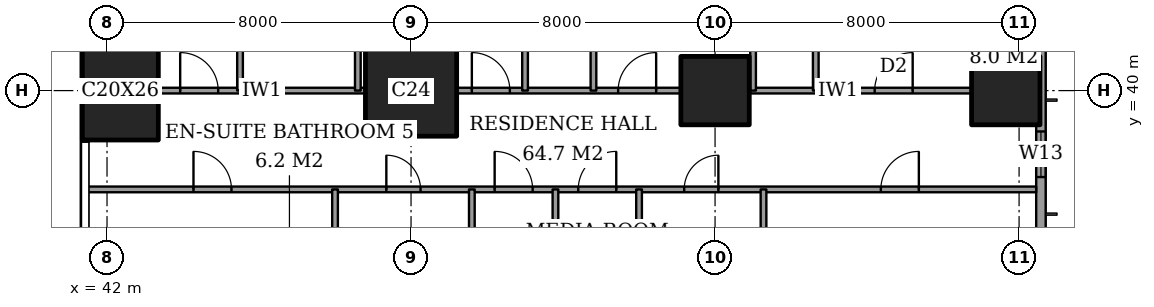
"""IFC4 building model, lengths in metres.
Left out: names, types, materials, properties, quantities, classifications, styles, units other than length and angle.
Written with IfcOpenShell. Run it as: python <this file> out.ifc"""

import sys

from ifc_helpers import new_model, si_unit, direction, frame, frame_2d, origin, origin_2d, place, context, subcontext, project, spatial, rectangle, extrude, element, fill, save


model = new_model("IFC4")
c1 = context("Model", 3, precision=1e-05, world=origin(), true_north=direction((0.0, 1.0)))
c2 = subcontext(c1, "Body", "Model", "MODEL_VIEW")
j1 = project(units=[si_unit("LENGTHUNIT", "METRE"), si_unit("PLANEANGLEUNIT", "RADIAN")], contexts=[c1])
p1 = place(None, origin())
s1 = spatial("IfcSite", under=j1, at=p1, CompositionType="ELEMENT")
p2 = place(p1, origin())
s2 = spatial("IfcBuilding", under=s1, at=p2, CompositionType="ELEMENT")
p3 = place(p2, frame((0.0, 0.0, 185.8)))
s3 = spatial("IfcBuildingStorey", under=s2, at=p3, CompositionType="ELEMENT", Elevation=185.8)
p4 = place(p3, frame((42.35, 40.0, 0.0), z_axis=(0.0, 0.0, 1.0), x_axis=(1.0, 0.0, 0.0)))
e1 = element("IfcColumn", 1, at=p4, inside=s3, PredefinedType="COLUMN", context=c2, shape_type="SweptSolid", body=[
    extrude(rectangle(XDim=2.0, YDim=2.6, at=origin_2d()), origin(), (0.0, 0.0, 1.0), 3.6),
])
p5 = place(p3, frame((50.0, 40.0, 0.0), z_axis=(0.0, 0.0, 1.0), x_axis=(1.0, 0.0, 0.0)))
e2 = element("IfcColumn", 2, at=p5, inside=s3, PredefinedType="COLUMN", context=c2, shape_type="SweptSolid", body=[
    extrude(rectangle(XDim=2.4, YDim=2.4, at=origin_2d()), origin(), (0.0, 0.0, 1.0), 3.6),
])
for number, where, z_axis, x_axis in (
    (3, (58.0, 40.0, 0.0), (0.0, 0.0, 1.0), (1.0, 0.0, 0.0)),
    (4, (65.65, 40.0, 0.0), (0.0, 0.0, 1.0), (1.0, 0.0, 0.0)),
):
    element("IfcColumn", number, at=place(p3, frame(where, z_axis=z_axis, x_axis=x_axis)), inside=s3, PredefinedType="COLUMN", context=c2, shape_type="SweptSolid", body=[
        extrude(rectangle(XDim=1.8, YDim=1.8, at=origin_2d()), origin(), (0.0, 0.0, 1.0), 3.6),
    ])
p6 = place(p3, frame((66.575, 3.175, 0.0), z_axis=(0.0, 0.0, 1.0), x_axis=(0.0, 1.0, 0.0)))
e5 = element("IfcWall", 5, at=p6, inside=s3, PredefinedType="SOLIDWALL", context=c2, shape_type="SweptSolid", body=[
    extrude(rectangle(XDim=41.65, YDim=0.25, at=frame_2d((20.825, 0.0))), origin(), (0.0, 0.0, 1.0), 3.6),
])
p7 = place(p6, frame((0.825, 0.0, 0.2)))
e6 = element("IfcOpeningElement", 6, at=p7, cuts=e5, PredefinedType="OPENING", context=c2, shape_type="SweptSolid", body=[
    extrude(rectangle(XDim=2.4, YDim=2.4, at=frame_2d((1.2, 1.2))), frame((0.0, 0.135, 0.0), z_axis=(0.0, -1.0, 0.0), x_axis=(1.0, 0.0, 0.0)), (0.0, 0.0, 1.0), 0.27),
])
p8 = place(p6, frame((6.6, 0.0, 0.2)))
e7 = element("IfcOpeningElement", 7, at=p8, cuts=e5, PredefinedType="OPENING", context=c2, shape_type="SweptSolid", body=[
    extrude(rectangle(XDim=1.2, YDim=2.4, at=frame_2d((0.6, 1.2))), frame((0.0, 0.135, 0.0), z_axis=(0.0, -1.0, 0.0), x_axis=(1.0, 0.0, 0.0)), (0.0, 0.0, 1.0), 0.27),
])
p9 = place(p6, frame((8.775, 0.0, 0.2)))
e8 = element("IfcOpeningElement", 8, at=p9, cuts=e5, PredefinedType="OPENING", context=c2, shape_type="SweptSolid", body=[
    extrude(rectangle(XDim=2.4, YDim=2.4, at=frame_2d((1.2, 1.2))), frame((0.0, 0.135, 0.0), z_axis=(0.0, -1.0, 0.0), x_axis=(1.0, 0.0, 0.0)), (0.0, 0.0, 1.0), 0.27),
])
p10 = place(p6, frame((15.675, 0.0, 0.2)))
e9 = element("IfcOpeningElement", 9, at=p10, cuts=e5, PredefinedType="OPENING", context=c2, shape_type="SweptSolid", body=[
    extrude(rectangle(XDim=2.4, YDim=2.4, at=frame_2d((1.2, 1.2))), frame((0.0, 0.135, 0.0), z_axis=(0.0, -1.0, 0.0), x_axis=(1.0, 0.0, 0.0)), (0.0, 0.0, 1.0), 0.27),
])
p11 = place(p6, frame((23.575, 0.0, 0.2)))
e10 = element("IfcOpeningElement", 10, at=p11, cuts=e5, PredefinedType="OPENING", context=c2, shape_type="SweptSolid", body=[
    extrude(rectangle(XDim=2.4, YDim=2.4, at=frame_2d((1.2, 1.2))), frame((0.0, 0.135, 0.0), z_axis=(0.0, -1.0, 0.0), x_axis=(1.0, 0.0, 0.0)), (0.0, 0.0, 1.0), 0.27),
])
p12 = place(p6, frame((30.775, 0.0, 0.2)))
e11 = element("IfcOpeningElement", 11, at=p12, cuts=e5, PredefinedType="OPENING", context=c2, shape_type="SweptSolid", body=[
    extrude(rectangle(XDim=2.4, YDim=2.4, at=frame_2d((1.2, 1.2))), frame((0.0, 0.135, 0.0), z_axis=(0.0, -1.0, 0.0), x_axis=(1.0, 0.0, 0.0)), (0.0, 0.0, 1.0), 0.27),
])
p13 = place(p6, frame((34.55, 0.0, 0.2)))
e12 = element("IfcOpeningElement", 12, at=p13, cuts=e5, PredefinedType="OPENING", context=c2, shape_type="SweptSolid", body=[
    extrude(rectangle(XDim=1.2, YDim=2.4, at=frame_2d((0.6, 1.2))), frame((0.0, 0.135, 0.0), z_axis=(0.0, -1.0, 0.0), x_axis=(1.0, 0.0, 0.0)), (0.0, 0.0, 1.0), 0.27),
])
p14 = place(p6, frame((38.425, 0.0, 0.2)))
e13 = element("IfcOpeningElement", 13, at=p14, cuts=e5, PredefinedType="OPENING", context=c2, shape_type="SweptSolid", body=[
    extrude(rectangle(XDim=2.4, YDim=2.4, at=frame_2d((1.2, 1.2))), frame((0.0, 0.135, 0.0), z_axis=(0.0, -1.0, 0.0), x_axis=(1.0, 0.0, 0.0)), (0.0, 0.0, 1.0), 0.27),
])
p15 = place(p3, frame((41.439, 37.4, 0.0), z_axis=(0.0, 0.0, 1.0), x_axis=(1.0, 0.0, 0.0)))
e14 = element("IfcWall", 14, at=p15, inside=s3, PredefinedType="PARTITIONING", context=c2, shape_type="SweptSolid", body=[
    extrude(rectangle(XDim=25.011, YDim=0.15, at=frame_2d((12.505, 0.0))), origin(), (0.0, 0.0, 1.0), 3.35),
])
p16 = place(p15, frame((10.761, 0.0, 0.0)))
e15 = element("IfcOpeningElement", 15, at=p16, cuts=e14, PredefinedType="OPENING", context=c2, shape_type="SweptSolid", body=[
    extrude(rectangle(XDim=1.0, YDim=2.1, at=frame_2d((0.5, 1.05))), frame((0.0, 0.085, 0.0), z_axis=(0.0, -1.0, 0.0), x_axis=(1.0, 0.0, 0.0)), (0.0, 0.0, 1.0), 0.17),
])
p17 = place(p15, frame((20.924, 0.0, 0.0)))
e16 = element("IfcOpeningElement", 16, at=p17, cuts=e14, PredefinedType="OPENING", context=c2, shape_type="SweptSolid", body=[
    extrude(rectangle(XDim=1.0, YDim=2.1, at=frame_2d((0.5, 1.05))), frame((0.0, 0.085, 0.0), z_axis=(0.0, -1.0, 0.0), x_axis=(1.0, 0.0, 0.0)), (0.0, 0.0, 1.0), 0.17),
])
p18 = place(p15, frame((15.749, 0.0, 0.0)))
e17 = element("IfcOpeningElement", 17, at=p18, cuts=e14, PredefinedType="OPENING", context=c2, shape_type="SweptSolid", body=[
    extrude(rectangle(XDim=0.9, YDim=2.1, at=frame_2d((0.45, 1.05))), frame((0.0, 0.085, 0.0), z_axis=(0.0, -1.0, 0.0), x_axis=(1.0, 0.0, 0.0)), (0.0, 0.0, 1.0), 0.17),
])
p19 = place(p15, frame((12.961, 0.0, 0.0)))
e18 = element("IfcOpeningElement", 18, at=p19, cuts=e14, PredefinedType="OPENING", context=c2, shape_type="SweptSolid", body=[
    extrude(rectangle(XDim=1.0, YDim=2.1, at=frame_2d((0.5, 1.05))), frame((0.0, 0.085, 0.0), z_axis=(0.0, -1.0, 0.0), x_axis=(1.0, 0.0, 0.0)), (0.0, 0.0, 1.0), 0.17),
])
p20 = place(p15, frame((7.911, 0.0, 0.0)))
e19 = element("IfcOpeningElement", 19, at=p20, cuts=e14, PredefinedType="OPENING", context=c2, shape_type="SweptSolid", body=[
    extrude(rectangle(XDim=0.9, YDim=2.1, at=frame_2d((0.45, 1.05))), frame((0.0, 0.085, 0.0), z_axis=(0.0, -1.0, 0.0), x_axis=(1.0, 0.0, 0.0)), (0.0, 0.0, 1.0), 0.17),
])
p21 = place(p15, frame((2.836, 0.0, 0.0)))
e20 = element("IfcOpeningElement", 20, at=p21, cuts=e14, PredefinedType="OPENING", context=c2, shape_type="SweptSolid", body=[
    extrude(rectangle(XDim=1.0, YDim=2.1, at=frame_2d((0.5, 1.05))), frame((0.0, 0.085, 0.0), z_axis=(0.0, -1.0, 0.0), x_axis=(1.0, 0.0, 0.0)), (0.0, 0.0, 1.0), 0.17),
])
p22 = place(p3, frame((43.35, 40.0, 0.0), z_axis=(0.0, 0.0, 1.0), x_axis=(1.0, 0.0, 0.0)))
e21 = element("IfcWall", 21, at=p22, inside=s3, PredefinedType="PARTITIONING", context=c2, shape_type="SweptSolid", body=[
    extrude(rectangle(XDim=5.45, YDim=0.15, at=frame_2d((2.725, 0.0))), origin(), (0.0, 0.0, 1.0), 3.35),
])
p23 = place(p22, frame((0.575, 0.0, 0.0)))
e22 = element("IfcOpeningElement", 22, at=p23, cuts=e21, PredefinedType="OPENING", context=c2, shape_type="SweptSolid", body=[
    extrude(rectangle(XDim=1.0, YDim=2.1, at=frame_2d((0.5, 1.05))), frame((0.0, 0.085, 0.0), z_axis=(0.0, -1.0, 0.0), x_axis=(1.0, 0.0, 0.0)), (0.0, 0.0, 1.0), 0.17),
])
p24 = place(p3, frame((51.2, 40.0, 0.0), z_axis=(0.0, 0.0, 1.0), x_axis=(1.0, 0.0, 0.0)))
e23 = element("IfcWall", 23, at=p24, inside=s3, PredefinedType="PARTITIONING", context=c2, shape_type="SweptSolid", body=[
    extrude(rectangle(XDim=5.9, YDim=0.15, at=frame_2d((2.95, 0.0))), origin(), (0.0, 0.0, 1.0), 3.35),
])
p25 = place(p24, frame((4.25, 0.0, 0.0)))
e24 = element("IfcOpeningElement", 24, at=p25, cuts=e23, PredefinedType="OPENING", context=c2, shape_type="SweptSolid", body=[
    extrude(rectangle(XDim=1.0, YDim=2.1, at=frame_2d((0.5, 1.05))), frame((0.0, 0.085, 0.0), z_axis=(0.0, -1.0, 0.0), x_axis=(1.0, 0.0, 0.0)), (0.0, 0.0, 1.0), 0.17),
])
p26 = place(p24, frame((0.4, 0.0, 0.0)))
e25 = element("IfcOpeningElement", 25, at=p26, cuts=e23, PredefinedType="OPENING", context=c2, shape_type="SweptSolid", body=[
    extrude(rectangle(XDim=1.0, YDim=2.1, at=frame_2d((0.5, 1.05))), frame((0.0, 0.085, 0.0), z_axis=(0.0, -1.0, 0.0), x_axis=(1.0, 0.0, 0.0)), (0.0, 0.0, 1.0), 0.17),
])
p27 = place(p3, frame((58.9, 40.0, 0.0), z_axis=(0.0, 0.0, 1.0), x_axis=(1.0, 0.0, 0.0)))
e26 = element("IfcWall", 26, at=p27, inside=s3, PredefinedType="PARTITIONING", context=c2, shape_type="SweptSolid", body=[
    extrude(rectangle(XDim=5.85, YDim=0.15, at=frame_2d((2.925, 0.0))), origin(), (0.0, 0.0, 1.0), 3.35),
])
p28 = place(p27, frame((3.3, 0.0, 0.0)))
e27 = element("IfcOpeningElement", 27, at=p28, cuts=e26, PredefinedType="OPENING", context=c2, shape_type="SweptSolid", body=[
    extrude(rectangle(XDim=1.0, YDim=2.1, at=frame_2d((0.5, 1.05))), frame((0.0, 0.085, 0.0), z_axis=(0.0, -1.0, 0.0), x_axis=(1.0, 0.0, 0.0)), (0.0, 0.0, 1.0), 0.17),
])
p29 = place(p3, frame((45.5, 40.0, 0.0), z_axis=(0.0, 0.0, 1.0), x_axis=(0.0, 1.0, 0.0)))
e28 = element("IfcWall", 28, at=p29, inside=s3, PredefinedType="PARTITIONING", context=c2, shape_type="SweptSolid", body=[
    extrude(rectangle(XDim=8.45, YDim=0.15, at=frame_2d((4.225, 0.0))), origin(), (0.0, 0.0, 1.0), 3.35),
])
p30 = place(p3, frame((48.0, 28.0, 0.0), z_axis=(0.0, 0.0, 1.0), x_axis=(0.0, 1.0, 0.0)))
e29 = element("IfcWall", 29, at=p30, inside=s3, PredefinedType="PARTITIONING", context=c2, shape_type="SweptSolid", body=[
    extrude(rectangle(XDim=9.4, YDim=0.15, at=frame_2d((4.7, 0.0))), origin(), (0.0, 0.0, 1.0), 3.35),
])
p31 = place(p30, frame((0.5, 0.0, 0.0)))
e30 = element("IfcOpeningElement", 30, at=p31, cuts=e29, PredefinedType="OPENING", context=c2, shape_type="SweptSolid", body=[
    extrude(rectangle(XDim=1.0, YDim=2.1, at=frame_2d((0.5, 1.05))), frame((0.0, 0.085, 0.0), z_axis=(0.0, -1.0, 0.0), x_axis=(1.0, 0.0, 0.0)), (0.0, 0.0, 1.0), 0.17),
])
p32 = place(p3, frame((48.6, 40.0, 0.0), z_axis=(0.0, 0.0, 1.0), x_axis=(0.0, 1.0, 0.0)))
e31 = element("IfcWall", 31, at=p32, inside=s3, PredefinedType="PARTITIONING", context=c2, shape_type="SweptSolid", body=[
    extrude(rectangle(XDim=8.45, YDim=0.15, at=frame_2d((4.225, 0.0))), origin(), (0.0, 0.0, 1.0), 3.35),
])
p33 = place(p32, frame((3.775, 0.0, 0.0)))
e32 = element("IfcOpeningElement", 32, at=p33, cuts=e31, PredefinedType="OPENING", context=c2, shape_type="SweptSolid", body=[
    extrude(rectangle(XDim=0.9, YDim=2.1, at=frame_2d((0.45, 1.05))), frame((0.0, 0.085, 0.0), z_axis=(0.0, -1.0, 0.0), x_axis=(1.0, 0.0, 0.0)), (0.0, 0.0, 1.0), 0.17),
])
p34 = place(p3, frame((51.6, 30.0, 0.0), z_axis=(0.0, 0.0, 1.0), x_axis=(0.0, 1.0, 0.0)))
e33 = element("IfcWall", 33, at=p34, inside=s3, PredefinedType="PARTITIONING", context=c2, shape_type="SweptSolid", body=[
    extrude(rectangle(XDim=7.4, YDim=0.15, at=frame_2d((3.7, 0.0))), origin(), (0.0, 0.0, 1.0), 3.35),
])
p35 = place(p3, frame((53.0, 40.0, 0.0), z_axis=(0.0, 0.0, 1.0), x_axis=(0.0, 1.0, 0.0)))
e34 = element("IfcWall", 34, at=p35, inside=s3, PredefinedType="PARTITIONING", context=c2, shape_type="SweptSolid", body=[
    extrude(rectangle(XDim=8.45, YDim=0.15, at=frame_2d((4.225, 0.0))), origin(), (0.0, 0.0, 1.0), 3.35),
])
p36 = place(p3, frame((53.8, 30.0, 0.0), z_axis=(0.0, 0.0, 1.0), x_axis=(0.0, 1.0, 0.0)))
e35 = element("IfcWall", 35, at=p36, inside=s3, PredefinedType="PARTITIONING", context=c2, shape_type="SweptSolid", body=[
    extrude(rectangle(XDim=7.4, YDim=0.15, at=frame_2d((3.7, 0.0))), origin(), (0.0, 0.0, 1.0), 3.35),
])
p37 = place(p3, frame((54.8, 40.0, 0.0), z_axis=(0.0, 0.0, 1.0), x_axis=(0.0, 1.0, 0.0)))
e36 = element("IfcWall", 36, at=p37, inside=s3, PredefinedType="PARTITIONING", context=c2, shape_type="SweptSolid", body=[
    extrude(rectangle(XDim=8.45, YDim=0.15, at=frame_2d((4.225, 0.0))), origin(), (0.0, 0.0, 1.0), 3.35),
])
p38 = place(p37, frame((3.775, 0.0, 0.0)))
e37 = element("IfcOpeningElement", 37, at=p38, cuts=e36, PredefinedType="OPENING", context=c2, shape_type="SweptSolid", body=[
    extrude(rectangle(XDim=0.9, YDim=2.1, at=frame_2d((0.45, 1.05))), frame((0.0, 0.085, 0.0), z_axis=(0.0, -1.0, 0.0), x_axis=(1.0, 0.0, 0.0)), (0.0, 0.0, 1.0), 0.17),
])
p39 = place(p3, frame((56.0, 28.0, 0.0), z_axis=(0.0, 0.0, 1.0), x_axis=(0.0, 1.0, 0.0)))
e38 = element("IfcWall", 38, at=p39, inside=s3, PredefinedType="PARTITIONING", context=c2, shape_type="SweptSolid", body=[
    extrude(rectangle(XDim=9.4, YDim=0.15, at=frame_2d((4.7, 0.0))), origin(), (0.0, 0.0, 1.0), 3.35),
])
p40 = place(p39, frame((0.5, 0.0, 0.0)))
e39 = element("IfcOpeningElement", 39, at=p40, cuts=e38, PredefinedType="OPENING", context=c2, shape_type="SweptSolid", body=[
    extrude(rectangle(XDim=1.0, YDim=2.1, at=frame_2d((0.5, 1.05))), frame((0.0, 0.085, 0.0), z_axis=(0.0, -1.0, 0.0), x_axis=(1.0, 0.0, 0.0)), (0.0, 0.0, 1.0), 0.17),
])
p41 = place(p3, frame((59.0, 40.0, 0.0), z_axis=(0.0, 0.0, 1.0), x_axis=(0.0, 1.0, 0.0)))
e40 = element("IfcWall", 40, at=p41, inside=s3, PredefinedType="PARTITIONING", context=c2, shape_type="SweptSolid", body=[
    extrude(rectangle(XDim=8.45, YDim=0.15, at=frame_2d((4.225, 0.0))), origin(), (0.0, 0.0, 1.0), 3.35),
])
p42 = place(p3, frame((59.275, 33.2, 0.0), z_axis=(0.0, 0.0, 1.0), x_axis=(0.0, 1.0, 0.0)))
e41 = element("IfcWall", 41, at=p42, inside=s3, PredefinedType="PARTITIONING", context=c2, shape_type="SweptSolid", body=[
    extrude(rectangle(XDim=4.2, YDim=0.15, at=frame_2d((2.1, 0.0))), origin(), (0.0, 0.0, 1.0), 3.35),
])
p43 = place(p3, frame((60.65, 40.0, 0.0), z_axis=(0.0, 0.0, 1.0), x_axis=(0.0, 1.0, 0.0)))
e42 = element("IfcWall", 42, at=p43, inside=s3, PredefinedType="PARTITIONING", context=c2, shape_type="SweptSolid", body=[
    extrude(rectangle(XDim=8.45, YDim=0.15, at=frame_2d((4.225, 0.0))), origin(), (0.0, 0.0, 1.0), 3.35),
])
p44 = place(p43, frame((3.775, 0.0, 0.0)))
e43 = element("IfcOpeningElement", 43, at=p44, cuts=e42, PredefinedType="OPENING", context=c2, shape_type="SweptSolid", body=[
    extrude(rectangle(XDim=0.9, YDim=2.1, at=frame_2d((0.45, 1.05))), frame((0.0, 0.085, 0.0), z_axis=(0.0, -1.0, 0.0), x_axis=(1.0, 0.0, 0.0)), (0.0, 0.0, 1.0), 0.17),
])
p45 = place(p3, frame((64.75, 40.9, 0.0), z_axis=(0.0, 0.0, 1.0), x_axis=(0.0, 1.0, 0.0)))
e44 = element("IfcWall", 44, at=p45, inside=s3, PredefinedType="PARTITIONING", context=c2, shape_type="SweptSolid", body=[
    extrude(rectangle(XDim=3.8, YDim=0.15, at=frame_2d((1.9, 0.0))), origin(), (0.0, 0.0, 1.0), 3.35),
])
p46 = place(p45, frame((1.45, 0.0, 0.0)))
e45 = element("IfcOpeningElement", 45, at=p46, cuts=e44, PredefinedType="OPENING", context=c2, shape_type="SweptSolid", body=[
    extrude(rectangle(XDim=0.9, YDim=2.1, at=frame_2d((0.45, 1.05))), frame((0.0, 0.085, 0.0), z_axis=(0.0, -1.0, 0.0), x_axis=(1.0, 0.0, 0.0)), (0.0, 0.0, 1.0), 0.17),
])
p47 = place(p13, origin())
e46 = element("IfcWindow", 46, at=p47, inside=s3, PartitioningType="SINGLE_PANEL", PredefinedType="WINDOW", context=c2, shape_type="SweptSolid", body=[
    extrude(rectangle(XDim=1.2, YDim=2.4, at=frame_2d((0.6, 1.2))), frame((0.0, 0.03, 0.0), z_axis=(0.0, -1.0, 0.0), x_axis=(1.0, 0.0, 0.0)), (0.0, 0.0, 1.0), 0.06),
])
fill(e12, e46)
p48 = place(p28, origin())
e47 = element("IfcDoor", 47, at=p48, inside=s3, OperationType="SINGLE_SWING_LEFT", PredefinedType="DOOR", context=c2, shape_type="SweptSolid", body=[
    extrude(rectangle(XDim=1.0, YDim=2.1, at=frame_2d((0.5, 1.05))), frame((0.0, 0.025, 0.0), z_axis=(0.0, -1.0, 0.0), x_axis=(1.0, 0.0, 0.0)), (0.0, 0.0, 1.0), 0.05),
])
fill(e27, e47)
p49 = place(p25, origin())
e48 = element("IfcDoor", 48, at=p49, inside=s3, OperationType="SINGLE_SWING_LEFT", PredefinedType="DOOR", context=c2, shape_type="SweptSolid", body=[
    extrude(rectangle(XDim=1.0, YDim=2.1, at=frame_2d((0.5, 1.05))), frame((0.0, 0.025, 0.0), z_axis=(0.0, -1.0, 0.0), x_axis=(1.0, 0.0, 0.0)), (0.0, 0.0, 1.0), 0.05),
])
fill(e24, e48)
p50 = place(p26, origin())
e49 = element("IfcDoor", 49, at=p50, inside=s3, OperationType="SINGLE_SWING_RIGHT", PredefinedType="DOOR", context=c2, shape_type="SweptSolid", body=[
    extrude(rectangle(XDim=1.0, YDim=2.1, at=frame_2d((0.5, 1.05))), frame((0.0, 0.025, 0.0), z_axis=(0.0, -1.0, 0.0), x_axis=(1.0, 0.0, 0.0)), (0.0, 0.0, 1.0), 0.05),
])
fill(e25, e49)
p51 = place(p23, origin())
e50 = element("IfcDoor", 50, at=p51, inside=s3, OperationType="SINGLE_SWING_RIGHT", PredefinedType="DOOR", context=c2, shape_type="SweptSolid", body=[
    extrude(rectangle(XDim=1.0, YDim=2.1, at=frame_2d((0.5, 1.05))), frame((0.0, 0.025, 0.0), z_axis=(0.0, -1.0, 0.0), x_axis=(1.0, 0.0, 0.0)), (0.0, 0.0, 1.0), 0.05),
])
fill(e22, e50)
p52 = place(p16, origin())
e51 = element("IfcDoor", 51, at=p52, inside=s3, OperationType="SINGLE_SWING_RIGHT", PredefinedType="DOOR", context=c2, shape_type="SweptSolid", body=[
    extrude(rectangle(XDim=1.0, YDim=2.1, at=frame_2d((0.5, 1.05))), frame((0.0, 0.025, 0.0), z_axis=(0.0, -1.0, 0.0), x_axis=(1.0, 0.0, 0.0)), (0.0, 0.0, 1.0), 0.05),
])
fill(e15, e51)
p53 = place(p17, origin())
e52 = element("IfcDoor", 52, at=p53, inside=s3, OperationType="SINGLE_SWING_LEFT", PredefinedType="DOOR", context=c2, shape_type="SweptSolid", body=[
    extrude(rectangle(XDim=1.0, YDim=2.1, at=frame_2d((0.5, 1.05))), frame((0.0, 0.025, 0.0), z_axis=(0.0, -1.0, 0.0), x_axis=(1.0, 0.0, 0.0)), (0.0, 0.0, 1.0), 0.05),
])
fill(e16, e52)
p54 = place(p18, origin())
e53 = element("IfcDoor", 53, at=p54, inside=s3, OperationType="SINGLE_SWING_LEFT", PredefinedType="DOOR", context=c2, shape_type="SweptSolid", body=[
    extrude(rectangle(XDim=0.9, YDim=2.1, at=frame_2d((0.45, 1.05))), frame((0.0, 0.025, 0.0), z_axis=(0.0, -1.0, 0.0), x_axis=(1.0, 0.0, 0.0)), (0.0, 0.0, 1.0), 0.05),
])
fill(e17, e53)
p55 = place(p19, origin())
e54 = element("IfcDoor", 54, at=p55, inside=s3, OperationType="SINGLE_SWING_LEFT", PredefinedType="DOOR", context=c2, shape_type="SweptSolid", body=[
    extrude(rectangle(XDim=1.0, YDim=2.1, at=frame_2d((0.5, 1.05))), frame((0.0, 0.025, 0.0), z_axis=(0.0, -1.0, 0.0), x_axis=(1.0, 0.0, 0.0)), (0.0, 0.0, 1.0), 0.05),
])
fill(e18, e54)
p56 = place(p20, origin())
e55 = element("IfcDoor", 55, at=p56, inside=s3, OperationType="SINGLE_SWING_RIGHT", PredefinedType="DOOR", context=c2, shape_type="SweptSolid", body=[
    extrude(rectangle(XDim=0.9, YDim=2.1, at=frame_2d((0.45, 1.05))), frame((0.0, 0.025, 0.0), z_axis=(0.0, -1.0, 0.0), x_axis=(1.0, 0.0, 0.0)), (0.0, 0.0, 1.0), 0.05),
])
fill(e19, e55)
p57 = place(p21, origin())
e56 = element("IfcDoor", 56, at=p57, inside=s3, OperationType="SINGLE_SWING_RIGHT", PredefinedType="DOOR", context=c2, shape_type="SweptSolid", body=[
    extrude(rectangle(XDim=1.0, YDim=2.1, at=frame_2d((0.5, 1.05))), frame((0.0, 0.025, 0.0), z_axis=(0.0, -1.0, 0.0), x_axis=(1.0, 0.0, 0.0)), (0.0, 0.0, 1.0), 0.05),
])
fill(e20, e56)
save(model, sys.argv[1])
